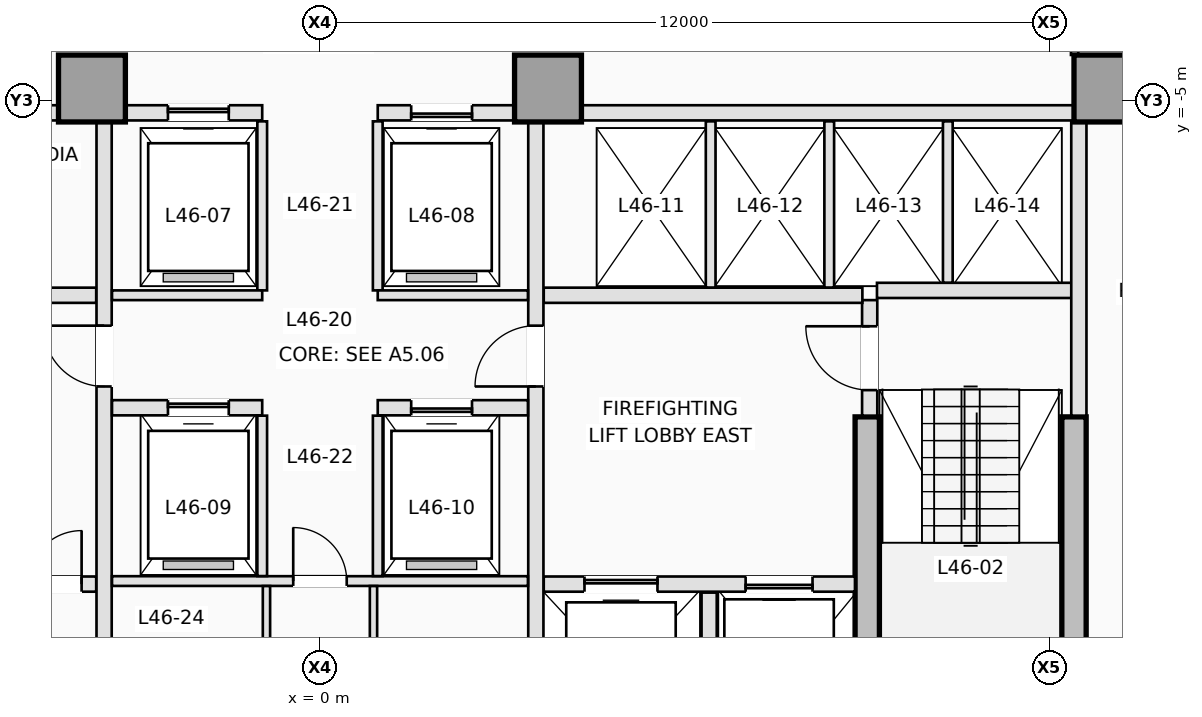
"""IFC4 building model, lengths in metres.
Left out: names, types, materials, properties, quantities, classifications, styles, units other than length and angle.
Written with IfcOpenShell. Run it as: python <this file> out.ifc"""

import sys

from ifc_helpers import new_model, si_unit, direction, frame, frame_2d, origin, origin_2d, place, context, subcontext, project, spatial, rectangle, extrude, element, fill, save


model = new_model("IFC4")
c1 = context("Model", 3, precision=1e-05, world=origin(), true_north=direction((0.0, 1.0)))
c2 = subcontext(c1, "Body", "Model", "MODEL_VIEW")
j1 = project(units=[si_unit("LENGTHUNIT", "METRE"), si_unit("PLANEANGLEUNIT", "RADIAN")], contexts=[c1])
p1 = place(None, origin())
s1 = spatial("IfcSite", under=j1, at=p1, CompositionType="ELEMENT")
p2 = place(p1, origin())
s2 = spatial("IfcBuilding", under=s1, at=p2, CompositionType="ELEMENT")
p3 = place(p2, frame((0.0, 0.0, 168.5)))
s3 = spatial("IfcBuildingStorey", under=s2, at=p3, CompositionType="ELEMENT", Elevation=168.5)
p4 = place(p3, frame((12.4, -15.7, 0.0), z_axis=(0.0, 0.0, 1.0), x_axis=(0.0, 1.0, 0.0)))
e1 = element("IfcWall", 1, at=p4, inside=s3, PredefinedType="SHEAR", context=c2, shape_type="SweptSolid", body=[
    extrude(rectangle(XDim=5.5, YDim=0.4, at=frame_2d((2.75, 0.0))), origin(), (0.0, 0.0, 1.0), 3.5),
])
p5 = place(p3, frame((9.0, -16.15, 0.0), z_axis=(0.0, 0.0, 1.0), x_axis=(0.0, 1.0, 0.0)))
e2 = element("IfcWall", 2, at=p5, inside=s3, PredefinedType="SHEAR", context=c2, shape_type="SweptSolid", body=[
    extrude(rectangle(XDim=5.95, YDim=0.4, at=frame_2d((2.975, 0.0))), origin(), (0.0, 0.0, 1.0), 3.5),
])
for number, where, z_axis, x_axis in (
    (3, (-3.75, -4.8, 0.0), (0.0, 0.0, 1.0), (1.0, 0.0, 0.0)),
    (4, (3.75, -4.8, 0.0), (0.0, 0.0, 1.0), (1.0, 0.0, 0.0)),
    (5, (12.95, -4.8, 0.0), (0.0, 0.0, 1.0), (1.0, 0.0, 0.0)),
):
    element("IfcColumn", number, at=place(p3, frame(where, z_axis=z_axis, x_axis=x_axis)), inside=s3, PredefinedType="COLUMN", context=c2, shape_type="SweptSolid", body=[
        extrude(rectangle(XDim=1.1, YDim=1.1, at=origin_2d()), origin(), (0.0, 0.0, 1.0), 3.5),
    ])
p6 = place(p3, frame((9.04, -10.18, 0.0), z_axis=(0.0, 0.0, 1.0), x_axis=(0.0, 1.0, 0.0)))
e6 = element("IfcWall", 6, at=p6, inside=s3, PredefinedType="PARTITIONING", context=c2, shape_type="SweptSolid", body=[
    extrude(rectangle(XDim=1.9, YDim=0.25, at=frame_2d((0.95, 0.0))), origin(), (0.0, 0.0, 1.0), 3.25),
])
p7 = place(p6, frame((0.42, 0.0, 0.0)))
e7 = element("IfcOpeningElement", 7, at=p7, cuts=e6, PredefinedType="OPENING", context=c2, shape_type="SweptSolid", body=[
    extrude(rectangle(XDim=1.05, YDim=2.15, at=frame_2d((0.525, 1.075))), frame((0.0, 0.135, 0.0), z_axis=(0.0, -1.0, 0.0), x_axis=(1.0, 0.0, 0.0)), (0.0, 0.0, 1.0), 0.27),
])
p8 = place(p3, frame((9.16, -8.12, 0.0), z_axis=(0.0, 0.0, 1.0), x_axis=(1.0, 0.0, 0.0)))
e8 = element("IfcWall", 8, at=p8, inside=s3, PredefinedType="PARTITIONING", context=c2, shape_type="SweptSolid", body=[
    extrude(rectangle(XDim=3.22, YDim=0.25, at=frame_2d((1.61, 0.0))), origin(), (0.0, 0.0, 1.0), 3.25),
])
p9 = place(p3, frame((12.48, -10.18, 0.0), z_axis=(0.0, 0.0, 1.0), x_axis=(0.0, 1.0, 0.0)))
e9 = element("IfcWall", 9, at=p9, inside=s3, PredefinedType="PARTITIONING", context=c2, shape_type="SweptSolid", body=[
    extrude(rectangle(XDim=4.828, YDim=0.25, at=frame_2d((2.414, 0.0))), origin(), (0.0, 0.0, 1.0), 3.25),
])
p10 = place(p3, frame((-8.798, -12.95, 0.0), z_axis=(0.0, 0.0, 1.0), x_axis=(1.0, 0.0, 0.0)))
e10 = element("IfcWall", 10, at=p10, inside=s3, PredefinedType="PARTITIONING", context=c2, shape_type="SweptSolid", body=[
    extrude(rectangle(XDim=5.118, YDim=0.25, at=frame_2d((2.559, 0.0))), origin(), (0.0, 0.0, 1.0), 3.25),
])
p11 = place(p10, frame((0.698, 0.0, 0.0)))
e11 = element("IfcOpeningElement", 11, at=p11, cuts=e10, PredefinedType="OPENING", context=c2, shape_type="SweptSolid", body=[
    extrude(rectangle(XDim=1.1, YDim=2.15, at=frame_2d((0.55, 1.075))), frame((0.0, 0.135, 0.0), z_axis=(0.0, -1.0, 0.0), x_axis=(1.0, 0.0, 0.0)), (0.0, 0.0, 1.0), 0.27),
])
p12 = place(p10, frame((2.598, 0.0, 0.0)))
e12 = element("IfcOpeningElement", 12, at=p12, cuts=e10, PredefinedType="OPENING", context=c2, shape_type="SweptSolid", body=[
    extrude(rectangle(XDim=0.88, YDim=2.1, at=frame_2d((0.44, 1.05))), frame((0.0, 0.135, 0.0), z_axis=(0.0, -1.0, 0.0), x_axis=(1.0, 0.0, 0.0)), (0.0, 0.0, 1.0), 0.27),
])
p13 = place(p10, frame((3.998, 0.0, 0.0)))
e13 = element("IfcOpeningElement", 13, at=p13, cuts=e10, PredefinedType="OPENING", context=c2, shape_type="SweptSolid", body=[
    extrude(rectangle(XDim=0.88, YDim=2.1, at=frame_2d((0.44, 1.05))), frame((0.0, 0.135, 0.0), z_axis=(0.0, -1.0, 0.0), x_axis=(1.0, 0.0, 0.0)), (0.0, 0.0, 1.0), 0.27),
])
p14 = place(p3, frame((3.68, -12.95, 0.0), z_axis=(0.0, 0.0, 1.0), x_axis=(1.0, 0.0, 0.0)))
e14 = element("IfcWall", 14, at=p14, inside=s3, PredefinedType="PARTITIONING", context=c2, shape_type="SweptSolid", body=[
    extrude(rectangle(XDim=5.118, YDim=0.25, at=frame_2d((2.559, 0.0))), origin(), (0.0, 0.0, 1.0), 3.25),
])
p15 = place(p14, frame((3.32, 0.0, 0.0)))
e15 = element("IfcOpeningElement", 15, at=p15, cuts=e14, PredefinedType="OPENING", context=c2, shape_type="SweptSolid", body=[
    extrude(rectangle(XDim=1.1, YDim=2.15, at=frame_2d((0.55, 1.075))), frame((0.0, 0.135, 0.0), z_axis=(0.0, -1.0, 0.0), x_axis=(1.0, 0.0, 0.0)), (0.0, 0.0, 1.0), 0.27),
])
p16 = place(p14, frame((0.67, 0.0, 0.0)))
e16 = element("IfcOpeningElement", 16, at=p16, cuts=e14, PredefinedType="OPENING", context=c2, shape_type="SweptSolid", body=[
    extrude(rectangle(XDim=1.2, YDim=2.15, at=frame_2d((0.6, 1.075))), frame((0.0, 0.135, 0.0), z_axis=(0.0, -1.0, 0.0), x_axis=(1.0, 0.0, 0.0)), (0.0, 0.0, 1.0), 0.27),
])
p17 = place(p3, frame((6.4, -15.92, 0.0), z_axis=(0.0, 0.0, 1.0), x_axis=(0.0, 1.0, 0.0)))
e17 = element("IfcWall", 17, at=p17, inside=s3, PredefinedType="PARTITIONING", context=c2, shape_type="SweptSolid", body=[
    extrude(rectangle(XDim=2.83, YDim=0.25, at=frame_2d((1.415, 0.0))), origin(), (0.0, 0.0, 1.0), 3.25),
])
for number, where, z_axis, x_axis in (
    (18, (-8.92, -8.2, 0.0), (0.0, 0.0, 1.0), (1.0, 0.0, 0.0)),
    (19, (3.68, -8.2, 0.0), (0.0, 0.0, 1.0), (1.0, 0.0, 0.0)),
):
    element("IfcWall", number, at=place(p3, frame(where, z_axis=z_axis, x_axis=x_axis)), inside=s3, PredefinedType="PARTITIONING", context=c2, shape_type="SweptSolid", body=[
        extrude(rectangle(XDim=5.24, YDim=0.25, at=frame_2d((2.62, 0.0))), origin(), (0.0, 0.0, 1.0), 3.25),
    ])
p18 = place(p3, frame((-3.55, -15.798, 0.0), z_axis=(0.0, 0.0, 1.0), x_axis=(0.0, 1.0, 0.0)))
e20 = element("IfcWall", 20, at=p18, inside=s3, PredefinedType="PARTITIONING", context=c2, shape_type="SweptSolid", body=[
    extrude(rectangle(XDim=10.446, YDim=0.25, at=frame_2d((5.223, 0.0))), origin(), (0.0, 0.0, 1.0), 3.25),
])
p19 = place(p18, frame((6.098, 0.0, 0.0)))
e21 = element("IfcOpeningElement", 21, at=p19, cuts=e20, PredefinedType="OPENING", context=c2, shape_type="SweptSolid", body=[
    extrude(rectangle(XDim=1.0, YDim=2.15, at=frame_2d((0.5, 1.075))), frame((0.0, 0.135, 0.0), z_axis=(0.0, -1.0, 0.0), x_axis=(1.0, 0.0, 0.0)), (0.0, 0.0, 1.0), 0.27),
])
p20 = place(p3, frame((3.55, -15.798, 0.0), z_axis=(0.0, 0.0, 1.0), x_axis=(0.0, 1.0, 0.0)))
e22 = element("IfcWall", 22, at=p20, inside=s3, PredefinedType="PARTITIONING", context=c2, shape_type="SweptSolid", body=[
    extrude(rectangle(XDim=10.446, YDim=0.25, at=frame_2d((5.223, 0.0))), origin(), (0.0, 0.0, 1.0), 3.25),
])
p21 = place(p20, frame((6.098, 0.0, 0.0)))
e23 = element("IfcOpeningElement", 23, at=p21, cuts=e22, PredefinedType="OPENING", context=c2, shape_type="SweptSolid", body=[
    extrude(rectangle(XDim=1.0, YDim=2.15, at=frame_2d((0.5, 1.075))), frame((0.0, 0.135, 0.0), z_axis=(0.0, -1.0, 0.0), x_axis=(1.0, 0.0, 0.0)), (0.0, 0.0, 1.0), 0.27),
])
p22 = place(p3, frame((-12.398, -5.2, 0.0), z_axis=(0.0, 0.0, 1.0), x_axis=(1.0, 0.0, 0.0)))
e24 = element("IfcWall", 24, at=p22, inside=s3, PredefinedType="PARTITIONING", context=c2, shape_type="SweptSolid", body=[
    extrude(rectangle(XDim=8.096, YDim=0.25, at=frame_2d((4.048, 0.0))), origin(), (0.0, 0.0, 1.0), 3.25),
])
p23 = place(p22, frame((2.968, 0.0, 0.0)))
e25 = element("IfcOpeningElement", 25, at=p23, cuts=e24, PredefinedType="OPENING", context=c2, shape_type="SweptSolid", body=[
    extrude(rectangle(XDim=0.92, YDim=2.12, at=frame_2d((0.46, 1.06))), frame((0.0, 0.135, 0.0), z_axis=(0.0, -1.0, 0.0), x_axis=(1.0, 0.0, 0.0)), (0.0, 0.0, 1.0), 0.27),
])
p24 = place(p22, frame((6.068, 0.0, 0.0)))
e26 = element("IfcOpeningElement", 26, at=p24, cuts=e24, PredefinedType="OPENING", context=c2, shape_type="SweptSolid", body=[
    extrude(rectangle(XDim=0.92, YDim=2.12, at=frame_2d((0.46, 1.06))), frame((0.0, 0.135, 0.0), z_axis=(0.0, -1.0, 0.0), x_axis=(1.0, 0.0, 0.0)), (0.0, 0.0, 1.0), 0.27),
])
p25 = place(p3, frame((4.302, -5.2, 0.0), z_axis=(0.0, 0.0, 1.0), x_axis=(1.0, 0.0, 0.0)))
e27 = element("IfcWall", 27, at=p25, inside=s3, PredefinedType="PARTITIONING", context=c2, shape_type="SweptSolid", body=[
    extrude(rectangle(XDim=8.096, YDim=0.25, at=frame_2d((4.048, 0.0))), origin(), (0.0, 0.0, 1.0), 3.25),
])
p26 = place(p3, frame((-3.198, -5.2, 0.0), z_axis=(0.0, 0.0, 1.0), x_axis=(1.0, 0.0, 0.0)))
e28 = element("IfcWall", 28, at=p26, inside=s3, PredefinedType="PARTITIONING", context=c2, shape_type="SweptSolid", body=[
    extrude(rectangle(XDim=2.248, YDim=0.25, at=frame_2d((1.124, 0.0))), origin(), (0.0, 0.0, 1.0), 3.25),
])
p27 = place(p26, frame((0.698, 0.0, 0.0)))
e29 = element("IfcOpeningElement", 29, at=p27, cuts=e28, PredefinedType="OPENING", context=c2, shape_type="SweptSolid", body=[
    extrude(rectangle(XDim=1.0, YDim=2.15, at=frame_2d((0.5, 1.075))), frame((0.0, 0.135, 0.0), z_axis=(0.0, -1.0, 0.0), x_axis=(1.0, 0.0, 0.0)), (0.0, 0.0, 1.0), 0.27),
])
p28 = place(p3, frame((0.95, -5.2, 0.0), z_axis=(0.0, 0.0, 1.0), x_axis=(1.0, 0.0, 0.0)))
e30 = element("IfcWall", 30, at=p28, inside=s3, PredefinedType="PARTITIONING", context=c2, shape_type="SweptSolid", body=[
    extrude(rectangle(XDim=2.248, YDim=0.25, at=frame_2d((1.124, 0.0))), origin(), (0.0, 0.0, 1.0), 3.25),
])
p29 = place(p28, frame((0.55, 0.0, 0.0)))
e31 = element("IfcOpeningElement", 31, at=p29, cuts=e30, PredefinedType="OPENING", context=c2, shape_type="SweptSolid", body=[
    extrude(rectangle(XDim=1.0, YDim=2.15, at=frame_2d((0.5, 1.075))), frame((0.0, 0.135, 0.0), z_axis=(0.0, -1.0, 0.0), x_axis=(1.0, 0.0, 0.0)), (0.0, 0.0, 1.0), 0.27),
])
for number, where, z_axis, x_axis in (
    (32, (6.425, -8.073, 0.0), (0.0, 0.0, 1.0), (0.0, 1.0, 0.0)),
    (33, (8.375, -8.073, 0.0), (0.0, 0.0, 1.0), (0.0, 1.0, 0.0)),
):
    element("IfcWall", number, at=place(p3, frame(where, z_axis=z_axis, x_axis=x_axis)), inside=s3, PredefinedType="PARTITIONING", context=c2, shape_type="SweptSolid", body=[
        extrude(rectangle(XDim=2.733, YDim=0.16, at=frame_2d((1.366, 0.0))), origin(), (0.0, 0.0, 1.0), 3.25),
    ])
p30 = place(p3, frame((10.325, -7.993, 0.0), z_axis=(0.0, 0.0, 1.0), x_axis=(0.0, 1.0, 0.0)))
e34 = element("IfcWall", 34, at=p30, inside=s3, PredefinedType="PARTITIONING", context=c2, shape_type="SweptSolid", body=[
    extrude(rectangle(XDim=2.653, YDim=0.16, at=frame_2d((1.326, 0.0))), origin(), (0.0, 0.0, 1.0), 3.25),
])
for number, where, z_axis, x_axis in (
    (35, (-0.95, -8.12, 0.0), (0.0, 0.0, 1.0), (0.0, 1.0, 0.0)),
    (36, (0.95, -8.12, 0.0), (0.0, 0.0, 1.0), (0.0, 1.0, 0.0)),
):
    element("IfcWall", number, at=place(p3, frame(where, z_axis=z_axis, x_axis=x_axis)), inside=s3, PredefinedType="PARTITIONING", context=c2, shape_type="SweptSolid", body=[
        extrude(rectangle(XDim=2.78, YDim=0.16, at=frame_2d((1.39, 0.0))), origin(), (0.0, 0.0, 1.0), 3.25),
    ])
for number, where, z_axis, x_axis in (
    (37, (-3.42, -8.2, 0.0), (0.0, 0.0, 1.0), (1.0, 0.0, 0.0)),
    (38, (0.95, -8.2, 0.0), (0.0, 0.0, 1.0), (1.0, 0.0, 0.0)),
):
    element("IfcWall", number, at=place(p3, frame(where, z_axis=z_axis, x_axis=x_axis)), inside=s3, PredefinedType="PARTITIONING", context=c2, shape_type="SweptSolid", body=[
        extrude(rectangle(XDim=2.47, YDim=0.16, at=frame_2d((1.235, 0.0))), origin(), (0.0, 0.0, 1.0), 3.25),
    ])
p31 = place(p3, frame((-3.42, -10.05, 0.0), z_axis=(0.0, 0.0, 1.0), x_axis=(1.0, 0.0, 0.0)))
e39 = element("IfcWall", 39, at=p31, inside=s3, PredefinedType="PARTITIONING", context=c2, shape_type="SweptSolid", body=[
    extrude(rectangle(XDim=2.47, YDim=0.25, at=frame_2d((1.235, 0.0))), origin(), (0.0, 0.0, 1.0), 3.25),
])
p32 = place(p31, frame((0.92, 0.0, 0.0)))
e40 = element("IfcOpeningElement", 40, at=p32, cuts=e39, PredefinedType="OPENING", context=c2, shape_type="SweptSolid", body=[
    extrude(rectangle(XDim=1.0, YDim=2.15, at=frame_2d((0.5, 1.075))), frame((0.0, 0.135, 0.0), z_axis=(0.0, -1.0, 0.0), x_axis=(1.0, 0.0, 0.0)), (0.0, 0.0, 1.0), 0.27),
])
p33 = place(p3, frame((0.95, -10.05, 0.0), z_axis=(0.0, 0.0, 1.0), x_axis=(1.0, 0.0, 0.0)))
e41 = element("IfcWall", 41, at=p33, inside=s3, PredefinedType="PARTITIONING", context=c2, shape_type="SweptSolid", body=[
    extrude(rectangle(XDim=2.47, YDim=0.25, at=frame_2d((1.235, 0.0))), origin(), (0.0, 0.0, 1.0), 3.25),
])
p34 = place(p33, frame((0.55, 0.0, 0.0)))
e42 = element("IfcOpeningElement", 42, at=p34, cuts=e41, PredefinedType="OPENING", context=c2, shape_type="SweptSolid", body=[
    extrude(rectangle(XDim=1.0, YDim=2.15, at=frame_2d((0.5, 1.075))), frame((0.0, 0.135, 0.0), z_axis=(0.0, -1.0, 0.0), x_axis=(1.0, 0.0, 0.0)), (0.0, 0.0, 1.0), 0.27),
])
p35 = place(p3, frame((-3.42, -12.9, 0.0), z_axis=(0.0, 0.0, 1.0), x_axis=(1.0, 0.0, 0.0)))
e43 = element("IfcWall", 43, at=p35, inside=s3, PredefinedType="PARTITIONING", context=c2, shape_type="SweptSolid", body=[
    extrude(rectangle(XDim=6.84, YDim=0.16, at=frame_2d((3.42, 0.0))), origin(), (0.0, 0.0, 1.0), 3.25),
])
p36 = place(p35, frame((2.98, 0.0, 0.0)))
e44 = element("IfcOpeningElement", 44, at=p36, cuts=e43, PredefinedType="OPENING", context=c2, shape_type="SweptSolid", body=[
    extrude(rectangle(XDim=0.88, YDim=2.12, at=frame_2d((0.44, 1.06))), frame((0.0, 0.09, 0.0), z_axis=(0.0, -1.0, 0.0), x_axis=(1.0, 0.0, 0.0)), (0.0, 0.0, 1.0), 0.18),
])
for number, where, z_axis, x_axis in (
    (45, (-0.95, -12.818, 0.0), (0.0, 0.0, 1.0), (0.0, 1.0, 0.0)),
    (46, (0.95, -12.818, 0.0), (0.0, 0.0, 1.0), (0.0, 1.0, 0.0)),
):
    element("IfcWall", number, at=place(p3, frame(where, z_axis=z_axis, x_axis=x_axis)), inside=s3, PredefinedType="PARTITIONING", context=c2, shape_type="SweptSolid", body=[
        extrude(rectangle(XDim=2.638, YDim=0.16, at=frame_2d((1.319, 0.0))), origin(), (0.0, 0.0, 1.0), 3.25),
    ])
p37 = place(p3, frame((-0.88, -16.02, 0.0), z_axis=(0.0, 0.0, 1.0), x_axis=(0.0, 1.0, 0.0)))
e47 = element("IfcWall", 47, at=p37, inside=s3, PredefinedType="PARTITIONING", context=c2, shape_type="SweptSolid", body=[
    extrude(rectangle(XDim=3.038, YDim=0.12, at=frame_2d((1.519, 0.0))), origin(), (0.0, 0.0, 1.0), 3.25),
])
p38 = place(p37, frame((1.05, 0.0, 0.0)))
e48 = element("IfcOpeningElement", 48, at=p38, cuts=e47, PredefinedType="OPENING", context=c2, shape_type="SweptSolid", body=[
    extrude(rectangle(XDim=0.88, YDim=2.12, at=frame_2d((0.44, 1.06))), frame((0.0, 0.07, 0.0), z_axis=(0.0, -1.0, 0.0), x_axis=(1.0, 0.0, 0.0)), (0.0, 0.0, 1.0), 0.14),
])
p39 = place(p3, frame((0.88, -16.02, 0.0), z_axis=(0.0, 0.0, 1.0), x_axis=(0.0, 1.0, 0.0)))
e49 = element("IfcWall", 49, at=p39, inside=s3, PredefinedType="PARTITIONING", context=c2, shape_type="SweptSolid", body=[
    extrude(rectangle(XDim=3.038, YDim=0.12, at=frame_2d((1.519, 0.0))), origin(), (0.0, 0.0, 1.0), 3.25),
])
p40 = place(p39, frame((1.05, 0.0, 0.0)))
e50 = element("IfcOpeningElement", 50, at=p40, cuts=e49, PredefinedType="OPENING", context=c2, shape_type="SweptSolid", body=[
    extrude(rectangle(XDim=0.88, YDim=2.12, at=frame_2d((0.44, 1.06))), frame((0.0, 0.07, 0.0), z_axis=(0.0, -1.0, 0.0), x_axis=(1.0, 0.0, 0.0)), (0.0, 0.0, 1.0), 0.14),
])
p41 = place(p3, frame((12.41, -2.462, 0.0), z_axis=(0.0, 0.0, 1.0), x_axis=(0.0, -1.0, 0.0)))
e51 = element("IfcWall", 51, at=p41, inside=s3, PredefinedType="PARTITIONING", context=c2, shape_type="SweptSolid", body=[
    extrude(rectangle(XDim=1.786, YDim=0.12, at=frame_2d((0.893, 0.0))), origin(), (0.0, 0.0, 1.0), 3.25),
])
p42 = place(p27, origin())
e52 = element("IfcDoor", 52, at=p42, inside=s3, OperationType="SLIDING_TO_LEFT", PredefinedType="DOOR", context=c2, shape_type="SweptSolid", body=[
    extrude(rectangle(XDim=1.0, YDim=2.15, at=frame_2d((0.5, 1.075))), frame((0.0, 0.025, 0.0), z_axis=(0.0, -1.0, 0.0), x_axis=(1.0, 0.0, 0.0)), (0.0, 0.0, 1.0), 0.05),
])
fill(e29, e52)
p43 = place(p29, origin())
e53 = element("IfcDoor", 53, at=p43, inside=s3, OperationType="SLIDING_TO_RIGHT", PredefinedType="DOOR", context=c2, shape_type="SweptSolid", body=[
    extrude(rectangle(XDim=1.0, YDim=2.15, at=frame_2d((0.5, 1.075))), frame((0.0, 0.025, 0.0), z_axis=(0.0, -1.0, 0.0), x_axis=(1.0, 0.0, 0.0)), (0.0, 0.0, 1.0), 0.05),
])
fill(e31, e53)
p44 = place(p15, origin())
e54 = element("IfcDoor", 54, at=p44, inside=s3, OperationType="SLIDING_TO_RIGHT", PredefinedType="DOOR", context=c2, shape_type="SweptSolid", body=[
    extrude(rectangle(XDim=1.1, YDim=2.15, at=frame_2d((0.55, 1.075))), frame((0.0, 0.025, 0.0), z_axis=(0.0, -1.0, 0.0), x_axis=(1.0, 0.0, 0.0)), (0.0, 0.0, 1.0), 0.05),
])
fill(e15, e54)
p45 = place(p16, origin())
e55 = element("IfcDoor", 55, at=p45, inside=s3, OperationType="SLIDING_TO_LEFT", PredefinedType="DOOR", context=c2, shape_type="SweptSolid", body=[
    extrude(rectangle(XDim=1.2, YDim=2.15, at=frame_2d((0.6, 1.075))), frame((0.0, 0.025, 0.0), z_axis=(0.0, -1.0, 0.0), x_axis=(1.0, 0.0, 0.0)), (0.0, 0.0, 1.0), 0.05),
])
fill(e16, e55)
p46 = place(p32, origin())
e56 = element("IfcDoor", 56, at=p46, inside=s3, OperationType="SLIDING_TO_LEFT", PredefinedType="DOOR", context=c2, shape_type="SweptSolid", body=[
    extrude(rectangle(XDim=1.0, YDim=2.15, at=frame_2d((0.5, 1.075))), frame((0.0, 0.025, 0.0), z_axis=(0.0, -1.0, 0.0), x_axis=(1.0, 0.0, 0.0)), (0.0, 0.0, 1.0), 0.05),
])
fill(e40, e56)
p47 = place(p34, origin())
e57 = element("IfcDoor", 57, at=p47, inside=s3, OperationType="SLIDING_TO_RIGHT", PredefinedType="DOOR", context=c2, shape_type="SweptSolid", body=[
    extrude(rectangle(XDim=1.0, YDim=2.15, at=frame_2d((0.5, 1.075))), frame((0.0, 0.025, 0.0), z_axis=(0.0, -1.0, 0.0), x_axis=(1.0, 0.0, 0.0)), (0.0, 0.0, 1.0), 0.05),
])
fill(e42, e57)
p48 = place(p7, origin())
e58 = element("IfcDoor", 58, at=p48, inside=s3, OperationType="SINGLE_SWING_RIGHT", PredefinedType="DOOR", context=c2, shape_type="SweptSolid", body=[
    extrude(rectangle(XDim=1.05, YDim=2.15, at=frame_2d((0.525, 1.075))), frame((0.0, 0.025, 0.0), z_axis=(0.0, -1.0, 0.0), x_axis=(1.0, 0.0, 0.0)), (0.0, 0.0, 1.0), 0.05),
])
fill(e7, e58)
p49 = place(p13, origin())
e59 = element("IfcDoor", 59, at=p49, inside=s3, OperationType="SINGLE_SWING_RIGHT", PredefinedType="TRAPDOOR", context=c2, shape_type="SweptSolid", body=[
    extrude(rectangle(XDim=0.88, YDim=2.1, at=frame_2d((0.44, 1.05))), frame((0.0, 0.025, 0.0), z_axis=(0.0, -1.0, 0.0), x_axis=(1.0, 0.0, 0.0)), (0.0, 0.0, 1.0), 0.05),
])
fill(e13, e59)
p50 = place(p19, origin())
e60 = element("IfcDoor", 60, at=p50, inside=s3, OperationType="SINGLE_SWING_RIGHT", PredefinedType="DOOR", context=c2, shape_type="SweptSolid", body=[
    extrude(rectangle(XDim=1.0, YDim=2.15, at=frame_2d((0.5, 1.075))), frame((0.0, 0.025, 0.0), z_axis=(0.0, -1.0, 0.0), x_axis=(1.0, 0.0, 0.0)), (0.0, 0.0, 1.0), 0.05),
])
fill(e21, e60)
p51 = place(p21, origin())
e61 = element("IfcDoor", 61, at=p51, inside=s3, OperationType="SINGLE_SWING_LEFT", PredefinedType="DOOR", context=c2, shape_type="SweptSolid", body=[
    extrude(rectangle(XDim=1.0, YDim=2.15, at=frame_2d((0.5, 1.075))), frame((0.0, 0.025, 0.0), z_axis=(0.0, -1.0, 0.0), x_axis=(1.0, 0.0, 0.0)), (0.0, 0.0, 1.0), 0.05),
])
fill(e23, e61)
p52 = place(p36, origin())
e62 = element("IfcDoor", 62, at=p52, inside=s3, OperationType="SINGLE_SWING_LEFT", PredefinedType="DOOR", context=c2, shape_type="SweptSolid", body=[
    extrude(rectangle(XDim=0.88, YDim=2.12, at=frame_2d((0.44, 1.06))), frame((0.0, 0.025, 0.0), z_axis=(0.0, -1.0, 0.0), x_axis=(1.0, 0.0, 0.0)), (0.0, 0.0, 1.0), 0.05),
])
fill(e44, e62)
save(model, sys.argv[1])
